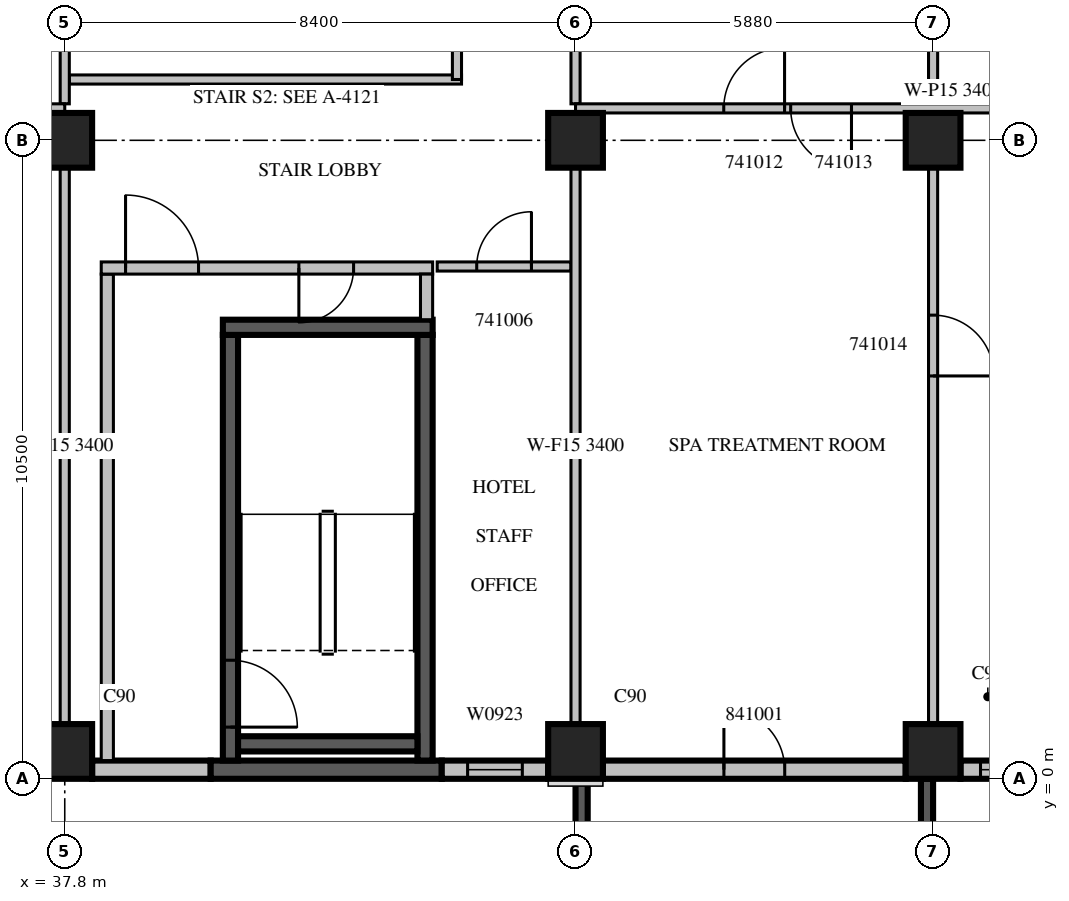
"""IFC4 building model, lengths in metres.
Left out: names, types, materials, properties, quantities, classifications, styles, units other than length and angle.
Written with IfcOpenShell. Run it as: python <this file> out.ifc"""

import sys

from ifc_helpers import new_model, si_unit, direction, frame, frame_2d, origin, origin_2d, place, context, subcontext, project, spatial, rectangle, extrude, source, transform, mapped, element, fill, save


model = new_model("IFC4")
c1 = context("Model", 3, precision=1e-05, world=origin(), true_north=direction((0.0, 1.0)))
c2 = subcontext(c1, "Body", "Model", "MODEL_VIEW")
j1 = project(units=[si_unit("LENGTHUNIT", "METRE"), si_unit("PLANEANGLEUNIT", "RADIAN")], contexts=[c1])
p1 = place(None, origin())
s1 = spatial("IfcSite", under=j1, at=p1, CompositionType="ELEMENT")
p2 = place(p1, origin())
s2 = spatial("IfcBuilding", under=s1, at=p2, CompositionType="ELEMENT")
p3 = place(p2, frame((0.0, 0.0, 189.2)))
s3 = spatial("IfcBuildingStorey", under=s2, at=p3, CompositionType="ELEMENT", Elevation=189.2)
m1 = source(origin(), c2, "Body", "SweptSolid", [
    extrude(rectangle(XDim=0.9, YDim=0.9, at=origin_2d()), origin(), (0.0, 0.0, 1.0), 3.8),
])
for number, where, z_axis, x_axis in (
    (1, (37.8, 0.45, 0.0), (0.0, 0.0, 1.0), (1.0, 0.0, 0.0)),
    (2, (46.2, 0.45, 0.0), (0.0, 0.0, 1.0), (1.0, 0.0, 0.0)),
    (3, (52.08, 0.45, 0.0), (0.0, 0.0, 1.0), (1.0, 0.0, 0.0)),
    (4, (37.8, 10.5, 0.0), (0.0, 0.0, 1.0), (1.0, 0.0, 0.0)),
    (5, (46.2, 10.5, 0.0), (0.0, 0.0, 1.0), (1.0, 0.0, 0.0)),
    (6, (52.08, 10.5, 0.0), (0.0, 0.0, 1.0), (1.0, 0.0, 0.0)),
):
    element("IfcColumn", number, at=place(p3, frame(where, z_axis=z_axis, x_axis=x_axis)), inside=s3, PredefinedType="COLUMN", context=c2, shape_type="MappedRepresentation", body=[
        mapped(m1, transform((0.0, 0.0, 0.0), scale=1.0)),
    ])
m2 = source(origin(), c2, "Body", "SweptSolid", [
    extrude(rectangle(XDim=1.95, YDim=0.3, at=frame_2d((0.975, 0.0))), origin(), (0.0, 0.0, 1.0), 3.4),
])
p4 = place(p3, frame((38.25, 0.15, 0.0), z_axis=(0.0, 0.0, 1.0), x_axis=(1.0, 0.0, 0.0)))
e7 = element("IfcWall", 7, at=p4, inside=s3, PredefinedType="STANDARD", context=c2, shape_type="MappedRepresentation", body=[
    mapped(m2, transform((0.0, 0.0, 0.0), scale=1.0)),
])
m3 = source(origin(), c2, "Body", "SweptSolid", [
    extrude(rectangle(XDim=3.8, YDim=0.3, at=frame_2d((1.9, 0.0))), origin(), (0.0, 0.0, 1.0), 3.4),
])
p5 = place(p3, frame((40.2, 0.15, 0.0), z_axis=(0.0, 0.0, 1.0), x_axis=(1.0, 0.0, 0.0)))
e8 = element("IfcWall", 8, at=p5, inside=s3, PredefinedType="SOLIDWALL", context=c2, shape_type="MappedRepresentation", body=[
    mapped(m3, transform((0.0, 0.0, 0.0), scale=1.0)),
])
m4 = source(origin(), c2, "Body", "SweptSolid", [
    extrude(rectangle(XDim=1.75, YDim=0.3, at=frame_2d((0.875, 0.0))), origin(), (0.0, 0.0, 1.0), 3.4),
])
p6 = place(p3, frame((44.0, 0.15, 0.0), z_axis=(0.0, 0.0, 1.0), x_axis=(1.0, 0.0, 0.0)))
e9 = element("IfcWall", 9, at=p6, inside=s3, PredefinedType="STANDARD", context=c2, shape_type="MappedRepresentation", body=[
    mapped(m4, transform((0.0, 0.0, 0.0), scale=1.0)),
])
m5 = source(origin(), c2, "Body", "SweptSolid", [
    extrude(rectangle(XDim=0.9, YDim=2.3, at=frame_2d((0.45, 1.15))), frame((0.0, 0.16, 0.0), z_axis=(0.0, -1.0, 0.0), x_axis=(1.0, 0.0, 0.0)), (0.0, 0.0, 1.0), 0.32),
])
p7 = place(p6, frame((0.425, 0.0, 0.6)))
e10 = element("IfcOpeningElement", 10, at=p7, cuts=e9, PredefinedType="OPENING", context=c2, shape_type="MappedRepresentation", body=[
    mapped(m5, transform((0.0, 0.0, 0.0), scale=1.0)),
])
m6 = source(origin(), c2, "Body", "SweptSolid", [
    extrude(rectangle(XDim=4.98, YDim=0.3, at=frame_2d((2.49, 0.0))), origin(), (0.0, 0.0, 1.0), 3.4),
])
p8 = place(p3, frame((46.65, 0.15, 0.0), z_axis=(0.0, 0.0, 1.0), x_axis=(1.0, 0.0, 0.0)))
e11 = element("IfcWall", 11, at=p8, inside=s3, PredefinedType="STANDARD", context=c2, shape_type="MappedRepresentation", body=[
    mapped(m6, transform((0.0, 0.0, 0.0), scale=1.0)),
])
m7 = source(origin(), c2, "Body", "SweptSolid", [
    extrude(rectangle(XDim=1.0, YDim=2.1, at=frame_2d((0.5, 1.05))), frame((0.0, 0.16, 0.0), z_axis=(0.0, -1.0, 0.0), x_axis=(1.0, 0.0, 0.0)), (0.0, 0.0, 1.0), 0.32),
])
p9 = place(p8, frame((1.99, 0.0, 0.0)))
e12 = element("IfcOpeningElement", 12, at=p9, cuts=e11, PredefinedType="OPENING", context=c2, shape_type="MappedRepresentation", body=[
    mapped(m7, transform((0.0, 0.0, 0.0), scale=1.0)),
])
m8 = source(origin(), c2, "Body", "SweptSolid", [
    extrude(rectangle(XDim=2.91, YDim=0.3, at=frame_2d((1.455, 0.0))), origin(), (0.0, 0.0, 1.0), 3.4),
])
p10 = place(p3, frame((52.53, 0.15, 0.0), z_axis=(0.0, 0.0, 1.0), x_axis=(1.0, 0.0, 0.0)))
e13 = element("IfcWall", 13, at=p10, inside=s3, PredefinedType="STANDARD", context=c2, shape_type="MappedRepresentation", body=[
    mapped(m8, transform((0.0, 0.0, 0.0), scale=1.0)),
])
m9 = source(origin(), c2, "Body", "SweptSolid", [
    extrude(rectangle(XDim=1.8, YDim=2.3, at=frame_2d((0.9, 1.15))), frame((0.0, 0.16, 0.0), z_axis=(0.0, -1.0, 0.0), x_axis=(1.0, 0.0, 0.0)), (0.0, 0.0, 1.0), 0.32),
])
p11 = place(p10, frame((0.33, 0.0, 0.6)))
e14 = element("IfcOpeningElement", 14, at=p11, cuts=e13, PredefinedType="OPENING", context=c2, shape_type="MappedRepresentation", body=[
    mapped(m9, transform((0.0, 0.0, 0.0), scale=1.0)),
])
m10 = source(origin(), c2, "Body", "SweptSolid", [
    extrude(rectangle(XDim=3.9, YDim=0.2, at=frame_2d((1.95, 0.0))), origin(), (0.0, 0.0, 1.0), 3.39),
])
p12 = place(p3, frame((46.3, 0.0, 0.0), z_axis=(0.0, 0.0, 1.0), x_axis=(0.0, -1.0, 0.0)))
e15 = element("IfcWall", 15, at=p12, inside=s3, PredefinedType="SOLIDWALL", context=c2, shape_type="MappedRepresentation", body=[
    mapped(m10, transform((0.0, 0.0, 0.0), scale=1.0)),
])
m11 = source(origin(), c2, "Body", "SweptSolid", [
    extrude(rectangle(XDim=2.4, YDim=2.3, at=frame_2d((1.2, 1.15))), frame((0.0, 0.11, 0.0), z_axis=(0.0, -1.0, 0.0), x_axis=(1.0, 0.0, 0.0)), (0.0, 0.0, 1.0), 0.22),
])
p13 = place(p12, frame((0.75, 0.0, 0.6)))
e16 = element("IfcOpeningElement", 16, at=p13, cuts=e15, PredefinedType="OPENING", context=c2, shape_type="MappedRepresentation", body=[
    mapped(m11, transform((0.0, 0.0, 0.0), scale=1.0)),
])
p14 = place(p3, frame((51.98, 0.0, 0.0), z_axis=(0.0, 0.0, 1.0), x_axis=(0.0, -1.0, 0.0)))
e17 = element("IfcWall", 17, at=p14, inside=s3, PredefinedType="SOLIDWALL", context=c2, shape_type="MappedRepresentation", body=[
    mapped(m10, transform((0.0, 0.0, 0.0), scale=1.0)),
])
p15 = place(p14, frame((0.75, 0.0, 0.6)))
e18 = element("IfcOpeningElement", 18, at=p15, cuts=e17, PredefinedType="OPENING", context=c2, shape_type="MappedRepresentation", body=[
    mapped(m11, transform((0.0, 0.0, 0.0), scale=1.0)),
])
m12 = source(origin(), c2, "Body", "SweptSolid", [
    extrude(rectangle(XDim=7.0, YDim=0.25, at=frame_2d((3.5, 0.0))), origin(), (0.0, 0.0, 1.0), 3.4),
])
p16 = place(p3, frame((40.525, 0.3, 0.0), z_axis=(0.0, 0.0, 1.0), x_axis=(0.0, 1.0, 0.0)))
e19 = element("IfcWall", 19, at=p16, inside=s3, PredefinedType="SOLIDWALL", context=c2, shape_type="MappedRepresentation", body=[
    mapped(m12, transform((0.0, 0.0, 0.0), scale=1.0)),
])
m13 = source(origin(), c2, "Body", "SweptSolid", [
    extrude(rectangle(XDim=1.1, YDim=2.1, at=frame_2d((0.55, 1.05))), frame((0.0, 0.135, 0.0), z_axis=(0.0, -1.0, 0.0), x_axis=(1.0, 0.0, 0.0)), (0.0, 0.0, 1.0), 0.27),
])
p17 = place(p16, frame((0.55, 0.0, 0.0)))
e20 = element("IfcOpeningElement", 20, at=p17, cuts=e19, PredefinedType="OPENING", context=c2, shape_type="MappedRepresentation", body=[
    mapped(m13, transform((0.0, 0.0, 0.0), scale=1.0)),
])
p18 = place(p3, frame((43.725, 0.3, 0.0), z_axis=(0.0, 0.0, 1.0), x_axis=(0.0, 1.0, 0.0)))
e21 = element("IfcWall", 21, at=p18, inside=s3, PredefinedType="SOLIDWALL", context=c2, shape_type="MappedRepresentation", body=[
    mapped(m12, transform((0.0, 0.0, 0.0), scale=1.0)),
])
m14 = source(origin(), c2, "Body", "SweptSolid", [
    extrude(rectangle(XDim=3.45, YDim=0.25, at=frame_2d((1.725, 0.0))), origin(), (0.0, 0.0, 1.0), 3.4),
])
p19 = place(p3, frame((40.4, 7.425, 0.0), z_axis=(0.0, 0.0, 1.0), x_axis=(1.0, 0.0, 0.0)))
e22 = element("IfcWall", 22, at=p19, inside=s3, PredefinedType="SOLIDWALL", context=c2, shape_type="MappedRepresentation", body=[
    mapped(m14, transform((0.0, 0.0, 0.0), scale=1.0)),
])
m15 = source(origin(), c2, "Body", "SweptSolid", [
    extrude(rectangle(XDim=2.95, YDim=0.25, at=frame_2d((1.475, 0.0))), origin(), (0.0, 0.0, 1.0), 3.4),
])
p20 = place(p3, frame((40.65, 0.575, 0.0), z_axis=(0.0, 0.0, 1.0), x_axis=(1.0, 0.0, 0.0)))
e23 = element("IfcWall", 23, at=p20, inside=s3, PredefinedType="SOLIDWALL", context=c2, shape_type="MappedRepresentation", body=[
    mapped(m15, transform((0.0, 0.0, 0.0), scale=1.0)),
])
m16 = source(origin(), c2, "Body", "SweptSolid", [
    extrude(rectangle(XDim=8.0, YDim=0.2, at=frame_2d((4.0, 0.0))), origin(), (0.0, 0.0, 1.0), 3.4),
])
p21 = place(p3, frame((38.5, 0.3, 0.0), z_axis=(0.0, 0.0, 1.0), x_axis=(0.0, 1.0, 0.0)))
e24 = element("IfcWall", 24, at=p21, inside=s3, PredefinedType="PARTITIONING", context=c2, shape_type="MappedRepresentation", body=[
    mapped(m16, transform((0.0, 0.0, 0.0), scale=1.0)),
])
m17 = source(origin(), c2, "Body", "SweptSolid", [
    extrude(rectangle(XDim=5.45, YDim=0.2, at=frame_2d((2.725, 0.0))), origin(), (0.0, 0.0, 1.0), 3.4),
])
p22 = place(p3, frame((38.4, 8.4, 0.0), z_axis=(0.0, 0.0, 1.0), x_axis=(1.0, 0.0, 0.0)))
e25 = element("IfcWall", 25, at=p22, inside=s3, PredefinedType="PARTITIONING", context=c2, shape_type="MappedRepresentation", body=[
    mapped(m17, transform((0.0, 0.0, 0.0), scale=1.0)),
])
m18 = source(origin(), c2, "Body", "SweptSolid", [
    extrude(rectangle(XDim=1.2, YDim=2.1, at=frame_2d((0.6, 1.05))), frame((0.0, 0.11, 0.0), z_axis=(0.0, -1.0, 0.0), x_axis=(1.0, 0.0, 0.0)), (0.0, 0.0, 1.0), 0.22),
])
p23 = place(p22, frame((0.4, 0.0, 0.0)))
e26 = element("IfcOpeningElement", 26, at=p23, cuts=e25, PredefinedType="OPENING", context=c2, shape_type="MappedRepresentation", body=[
    mapped(m18, transform((0.0, 0.0, 0.0), scale=1.0)),
])
m19 = source(origin(), c2, "Body", "SweptSolid", [
    extrude(rectangle(XDim=0.9, YDim=2.1, at=frame_2d((0.45, 1.05))), frame((0.0, 0.11, 0.0), z_axis=(0.0, -1.0, 0.0), x_axis=(1.0, 0.0, 0.0)), (0.0, 0.0, 1.0), 0.22),
])
p24 = place(p22, frame((3.25, 0.0, 0.0)))
e27 = element("IfcOpeningElement", 27, at=p24, cuts=e25, PredefinedType="OPENING", context=c2, shape_type="MappedRepresentation", body=[
    mapped(m19, transform((0.0, 0.0, 0.0), scale=1.0)),
])
m20 = source(origin(), c2, "Body", "SweptSolid", [
    extrude(rectangle(XDim=0.75, YDim=0.2, at=frame_2d((0.375, 0.0))), origin(), (0.0, 0.0, 1.0), 3.4),
])
p25 = place(p3, frame((43.75, 7.55, 0.0), z_axis=(0.0, 0.0, 1.0), x_axis=(0.0, 1.0, 0.0)))
e28 = element("IfcWall", 28, at=p25, inside=s3, PredefinedType="PARTITIONING", context=c2, shape_type="MappedRepresentation", body=[
    mapped(m20, transform((0.0, 0.0, 0.0), scale=1.0)),
])
m21 = source(origin(), c2, "Body", "SweptSolid", [
    extrude(rectangle(XDim=6.45, YDim=0.15, at=frame_2d((3.225, 0.0))), origin(), (0.0, 0.0, 1.0), 3.4),
])
p26 = place(p3, frame((37.875, 11.5, 0.0), z_axis=(0.0, 0.0, 1.0), x_axis=(1.0, 0.0, 0.0)))
e29 = element("IfcWall", 29, at=p26, inside=s3, PredefinedType="PARTITIONING", context=c2, shape_type="MappedRepresentation", body=[
    mapped(m21, transform((0.0, 0.0, 0.0), scale=1.0)),
])
m22 = source(origin(), c2, "Body", "SweptSolid", [
    extrude(rectangle(XDim=3.575, YDim=0.15, at=frame_2d((1.788, 0.0))), origin(), (0.0, 0.0, 1.0), 3.4),
])
p27 = place(p3, frame((44.25, 11.5, 0.0), z_axis=(0.0, 0.0, 1.0), x_axis=(0.0, 1.0, 0.0)))
e30 = element("IfcWall", 30, at=p27, inside=s3, PredefinedType="PARTITIONING", context=c2, shape_type="MappedRepresentation", body=[
    mapped(m22, transform((0.0, 0.0, 0.0), scale=1.0)),
])
m23 = source(origin(), c2, "Body", "SweptSolid", [
    extrude(rectangle(XDim=2.2, YDim=0.15, at=frame_2d((1.1, 0.0))), origin(), (0.0, 0.0, 1.0), 3.4),
])
p28 = place(p3, frame((46.125, 8.425, 0.0), z_axis=(0.0, 0.0, 1.0), x_axis=(-1.0, 0.0, 0.0)))
e31 = element("IfcWall", 31, at=p28, inside=s3, PredefinedType="PARTITIONING", context=c2, shape_type="MappedRepresentation", body=[
    mapped(m23, transform((0.0, 0.0, 0.0), scale=1.0)),
])
m24 = source(origin(), c2, "Body", "SweptSolid", [
    extrude(rectangle(XDim=0.9, YDim=2.1, at=frame_2d((0.45, 1.05))), frame((0.0, 0.085, 0.0), z_axis=(0.0, -1.0, 0.0), x_axis=(1.0, 0.0, 0.0)), (0.0, 0.0, 1.0), 0.17),
])
p29 = place(p28, frame((0.65, 0.0, 0.0)))
e32 = element("IfcOpeningElement", 32, at=p29, cuts=e31, PredefinedType="OPENING", context=c2, shape_type="MappedRepresentation", body=[
    mapped(m24, transform((0.0, 0.0, 0.0), scale=1.0)),
])
m25 = source(origin(), c2, "Body", "SweptSolid", [
    extrude(rectangle(XDim=9.152, YDim=0.15, at=frame_2d((4.576, 0.0))), origin(), (0.0, 0.0, 1.0), 3.4),
])
p30 = place(p3, frame((37.8, 0.899, 0.0), z_axis=(0.0, 0.0, 1.0), x_axis=(0.0, 1.0, 0.0)))
e33 = element("IfcWall", 33, at=p30, inside=s3, PredefinedType="PARTITIONING", context=c2, shape_type="MappedRepresentation", body=[
    mapped(m25, transform((0.0, 0.0, 0.0), scale=1.0)),
])
m26 = source(origin(), c2, "Body", "SweptSolid", [
    extrude(rectangle(XDim=3.9, YDim=0.15, at=frame_2d((1.95, 0.0))), origin(), (0.0, 0.0, 1.0), 3.4),
])
p31 = place(p3, frame((37.8, 11.1, 0.0), z_axis=(0.0, 0.0, 1.0), x_axis=(0.0, 1.0, 0.0)))
e34 = element("IfcWall", 34, at=p31, inside=s3, PredefinedType="PARTITIONING", context=c2, shape_type="MappedRepresentation", body=[
    mapped(m26, transform((0.0, 0.0, 0.0), scale=1.0)),
])
m27 = source(origin(), c2, "Body", "SweptSolid", [
    extrude(rectangle(XDim=8.4, YDim=0.15, at=frame_2d((4.2, 0.0))), origin(), (0.0, 0.0, 1.0), 2.9),
])
p32 = place(p3, frame((37.8, 11.025, 0.0), z_axis=(0.0, 0.0, 1.0), x_axis=(-1.0, 0.0, 0.0)))
e35 = element("IfcWall", 35, at=p32, inside=s3, PredefinedType="PARTITIONING", context=c2, shape_type="MappedRepresentation", body=[
    mapped(m27, transform((0.0, 0.0, 0.0), scale=1.0)),
])
m28 = source(origin(), c2, "Body", "SweptSolid", [
    extrude(rectangle(XDim=1.1, YDim=2.1, at=frame_2d((0.55, 1.05))), frame((0.0, 0.085, 0.0), z_axis=(0.0, -1.0, 0.0), x_axis=(1.0, 0.0, 0.0)), (0.0, 0.0, 1.0), 0.17),
])
p33 = place(p32, frame((6.424, 0.0, 0.0)))
e36 = element("IfcOpeningElement", 36, at=p33, cuts=e35, PredefinedType="OPENING", context=c2, shape_type="MappedRepresentation", body=[
    mapped(m28, transform((0.0, 0.0, 0.0), scale=1.0)),
])
p34 = place(p32, frame((4.12, 0.0, 0.0)))
e37 = element("IfcOpeningElement", 37, at=p34, cuts=e35, PredefinedType="OPENING", context=c2, shape_type="MappedRepresentation", body=[
    mapped(m24, transform((0.0, 0.0, 0.0), scale=1.0)),
])
p35 = place(p32, frame((1.346, 0.0, 0.0)))
e38 = element("IfcOpeningElement", 38, at=p35, cuts=e35, PredefinedType="OPENING", context=c2, shape_type="MappedRepresentation", body=[
    mapped(m24, transform((0.0, 0.0, 0.0), scale=1.0)),
])
p36 = place(p3, frame((52.08, 0.899, 0.0), z_axis=(0.0, 0.0, 1.0), x_axis=(0.0, 1.0, 0.0)))
e39 = element("IfcWall", 39, at=p36, inside=s3, PredefinedType="PARTITIONING", context=c2, shape_type="MappedRepresentation", body=[
    mapped(m25, transform((0.0, 0.0, 0.0), scale=1.0)),
])
m29 = source(origin(), c2, "Body", "SweptSolid", [
    extrude(rectangle(XDim=1.0, YDim=2.1, at=frame_2d((0.5, 1.05))), frame((0.0, 0.085, 0.0), z_axis=(0.0, -1.0, 0.0), x_axis=(1.0, 0.0, 0.0)), (0.0, 0.0, 1.0), 0.17),
])
p37 = place(p36, frame((5.726, 0.0, 0.0)))
e40 = element("IfcOpeningElement", 40, at=p37, cuts=e39, PredefinedType="OPENING", context=c2, shape_type="MappedRepresentation", body=[
    mapped(m29, transform((0.0, 0.0, 0.0), scale=1.0)),
])
p38 = place(p3, frame((52.08, 11.1, 0.0), z_axis=(0.0, 0.0, 1.0), x_axis=(0.0, 1.0, 0.0)))
e41 = element("IfcWall", 41, at=p38, inside=s3, PredefinedType="PARTITIONING", context=c2, shape_type="MappedRepresentation", body=[
    mapped(m26, transform((0.0, 0.0, 0.0), scale=1.0)),
])
p39 = place(p3, frame((46.2, 0.899, 0.0), z_axis=(0.0, 0.0, 1.0), x_axis=(0.0, 1.0, 0.0)))
e42 = element("IfcWall", 42, at=p39, inside=s3, PredefinedType="PARTITIONING", context=c2, shape_type="MappedRepresentation", body=[
    mapped(m25, transform((0.0, 0.0, 0.0), scale=1.0)),
])
p40 = place(p3, frame((46.2, 11.1, 0.0), z_axis=(0.0, 0.0, 1.0), x_axis=(0.0, 1.0, 0.0)))
e43 = element("IfcWall", 43, at=p40, inside=s3, PredefinedType="PARTITIONING", context=c2, shape_type="MappedRepresentation", body=[
    mapped(m26, transform((0.0, 0.0, 0.0), scale=1.0)),
])
m30 = source(origin(), c2, "Body", "SweptSolid", [
    extrude(rectangle(XDim=13.14, YDim=0.15, at=frame_2d((6.57, 0.0))), origin(), (0.0, 0.0, 1.0), 3.4),
])
p41 = place(p3, frame((59.34, 11.025, 0.0), z_axis=(0.0, 0.0, 1.0), x_axis=(-1.0, 0.0, 0.0)))
e44 = element("IfcWall", 44, at=p41, inside=s3, PredefinedType="PARTITIONING", context=c2, shape_type="MappedRepresentation", body=[
    mapped(m30, transform((0.0, 0.0, 0.0), scale=1.0)),
])
p42 = place(p41, frame((9.703, 0.0, 0.0)))
e45 = element("IfcOpeningElement", 45, at=p42, cuts=e44, PredefinedType="OPENING", context=c2, shape_type="MappedRepresentation", body=[
    mapped(m29, transform((0.0, 0.0, 0.0), scale=1.0)),
])
p43 = place(p41, frame((8.602, 0.0, 0.0)))
e46 = element("IfcOpeningElement", 46, at=p43, cuts=e44, PredefinedType="OPENING", context=c2, shape_type="MappedRepresentation", body=[
    mapped(m29, transform((0.0, 0.0, 0.0), scale=1.0)),
])
p44 = place(p41, frame((5.061, 0.0, 0.0)))
e47 = element("IfcOpeningElement", 47, at=p44, cuts=e44, PredefinedType="OPENING", context=c2, shape_type="MappedRepresentation", body=[
    mapped(m24, transform((0.0, 0.0, 0.0), scale=1.0)),
])
p45 = place(p41, frame((2.546, 0.0, 0.0)))
e48 = element("IfcOpeningElement", 48, at=p45, cuts=e44, PredefinedType="OPENING", context=c2, shape_type="MappedRepresentation", body=[
    mapped(m24, transform((0.0, 0.0, 0.0), scale=1.0)),
])
m31 = source(origin(), c2, "Body", "SweptSolid", [
    extrude(rectangle(XDim=0.9, YDim=2.3, at=frame_2d((0.45, 1.15))), frame((0.0, 0.03, 0.0), z_axis=(0.0, -1.0, 0.0), x_axis=(1.0, 0.0, 0.0)), (0.0, 0.0, 1.0), 0.06),
])
p46 = place(p7, origin())
e49 = element("IfcWindow", 49, at=p46, inside=s3, PartitioningType="SINGLE_PANEL", PredefinedType="WINDOW", context=c2, shape_type="MappedRepresentation", body=[
    mapped(m31, transform((0.0, 0.0, 0.0), scale=1.0)),
])
fill(e10, e49)
m32 = source(origin(), c2, "Body", "SweptSolid", [
    extrude(rectangle(XDim=1.8, YDim=2.3, at=frame_2d((0.9, 1.15))), frame((0.0, 0.03, 0.0), z_axis=(0.0, -1.0, 0.0), x_axis=(1.0, 0.0, 0.0)), (0.0, 0.0, 1.0), 0.06),
])
p47 = place(p11, origin())
e50 = element("IfcWindow", 50, at=p47, inside=s3, PartitioningType="SINGLE_PANEL", PredefinedType="WINDOW", context=c2, shape_type="MappedRepresentation", body=[
    mapped(m32, transform((0.0, 0.0, 0.0), scale=1.0)),
])
fill(e14, e50)
m33 = source(origin(), c2, "Body", "SweptSolid", [
    extrude(rectangle(XDim=1.1, YDim=2.1, at=frame_2d((0.55, 1.05))), frame((0.0, 0.025, 0.0), z_axis=(0.0, -1.0, 0.0), x_axis=(1.0, 0.0, 0.0)), (0.0, 0.0, 1.0), 0.05),
])
p48 = place(p17, origin())
e51 = element("IfcDoor", 51, at=p48, inside=s3, OperationType="SINGLE_SWING_RIGHT", PredefinedType="DOOR", context=c2, shape_type="MappedRepresentation", body=[
    mapped(m33, transform((0.0, 0.0, 0.0), scale=1.0)),
])
fill(e20, e51)
m34 = source(origin(), c2, "Body", "SweptSolid", [
    extrude(rectangle(XDim=1.2, YDim=2.1, at=frame_2d((0.6, 1.05))), frame((0.0, 0.025, 0.0), z_axis=(0.0, -1.0, 0.0), x_axis=(1.0, 0.0, 0.0)), (0.0, 0.0, 1.0), 0.05),
])
p49 = place(p23, origin())
e52 = element("IfcDoor", 52, at=p49, inside=s3, OperationType="SINGLE_SWING_LEFT", PredefinedType="DOOR", context=c2, shape_type="MappedRepresentation", body=[
    mapped(m34, transform((0.0, 0.0, 0.0), scale=1.0)),
])
fill(e26, e52)
m35 = source(origin(), c2, "Body", "SweptSolid", [
    extrude(rectangle(XDim=0.9, YDim=2.1, at=frame_2d((0.45, 1.05))), frame((0.0, 0.025, 0.0), z_axis=(0.0, -1.0, 0.0), x_axis=(1.0, 0.0, 0.0)), (0.0, 0.0, 1.0), 0.05),
])
p50 = place(p24, origin())
e53 = element("IfcDoor", 53, at=p50, inside=s3, OperationType="SINGLE_SWING_RIGHT", PredefinedType="DOOR", context=c2, shape_type="MappedRepresentation", body=[
    mapped(m35, transform((0.0, 0.0, 0.0), scale=1.0)),
])
fill(e27, e53)
p51 = place(p29, origin())
e54 = element("IfcDoor", 54, at=p51, inside=s3, OperationType="SINGLE_SWING_RIGHT", PredefinedType="DOOR", context=c2, shape_type="MappedRepresentation", body=[
    mapped(m35, transform((0.0, 0.0, 0.0), scale=1.0)),
])
fill(e32, e54)
m36 = source(origin(), c2, "Body", "SweptSolid", [
    extrude(rectangle(XDim=1.0, YDim=2.1, at=frame_2d((0.5, 1.05))), frame((0.0, 0.025, 0.0), z_axis=(0.0, -1.0, 0.0), x_axis=(1.0, 0.0, 0.0)), (0.0, 0.0, 1.0), 0.05),
])
p52 = place(p42, origin())
e55 = element("IfcDoor", 55, at=p52, inside=s3, OperationType="SINGLE_SWING_RIGHT", PredefinedType="DOOR", context=c2, shape_type="MappedRepresentation", body=[
    mapped(m36, transform((0.0, 0.0, 0.0), scale=1.0)),
])
fill(e45, e55)
p53 = place(p43, origin())
e56 = element("IfcDoor", 56, at=p53, inside=s3, OperationType="SINGLE_SWING_LEFT", PredefinedType="DOOR", context=c2, shape_type="MappedRepresentation", body=[
    mapped(m36, transform((0.0, 0.0, 0.0), scale=1.0)),
])
fill(e46, e56)
p54 = place(p37, origin())
e57 = element("IfcDoor", 57, at=p54, inside=s3, OperationType="SINGLE_SWING_RIGHT", PredefinedType="DOOR", context=c2, shape_type="MappedRepresentation", body=[
    mapped(m36, transform((0.0, 0.0, 0.0), scale=1.0)),
])
fill(e40, e57)
p55 = place(p9, origin())
e58 = element("IfcDoor", 58, at=p55, inside=s3, OperationType="SINGLE_SWING_LEFT", PredefinedType="DOOR", context=c2, shape_type="MappedRepresentation", body=[
    mapped(m36, transform((0.0, 0.0, 0.0), scale=1.0)),
])
fill(e12, e58)
save(model, sys.argv[1])
